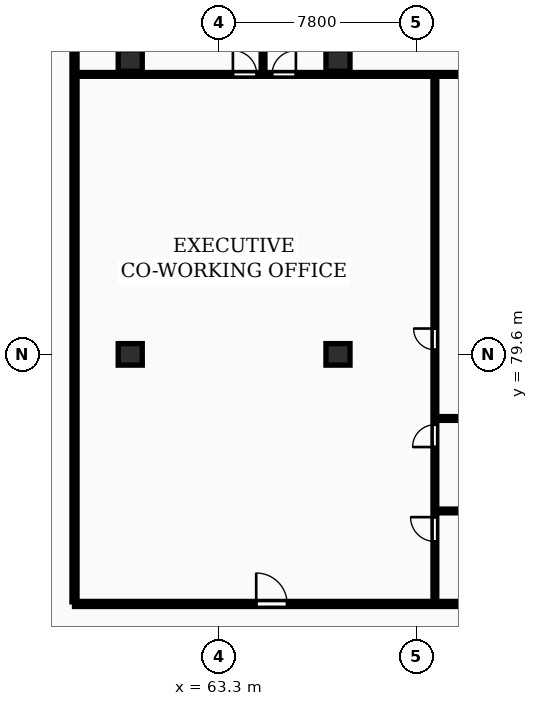
"""IFC4 building model, lengths in metres.
Left out: names, types, materials, properties, quantities, classifications, styles, units other than length and angle.
Written with IfcOpenShell. Run it as: python <this file> out.ifc"""

import sys

from ifc_helpers import new_model, si_unit, direction, frame, frame_2d, origin, origin_2d, place, context, subcontext, project, spatial, rectangle, extrude, element, fill, save


model = new_model("IFC4")
c1 = context("Model", 3, precision=1e-05, world=origin(), true_north=direction((0.0, 1.0)))
c2 = subcontext(c1, "Body", "Model", "MODEL_VIEW")
j1 = project(units=[si_unit("LENGTHUNIT", "METRE"), si_unit("PLANEANGLEUNIT", "RADIAN")], contexts=[c1])
p1 = place(None, origin())
s1 = spatial("IfcSite", under=j1, at=p1, CompositionType="ELEMENT")
p2 = place(p1, origin())
s2 = spatial("IfcBuilding", under=s1, at=p2, CompositionType="ELEMENT")
p3 = place(p2, frame((0.0, 0.0, 113.3)))
s3 = spatial("IfcBuildingStorey", under=s2, at=p3, CompositionType="ELEMENT", Elevation=113.3)
for number, where, z_axis, x_axis in (
    (1, (59.8, 79.6, 0.0), (0.0, 0.0, 1.0), (1.0, 0.0, 0.0)),
    (2, (59.8, 91.2, 0.0), (0.0, 0.0, 1.0), (1.0, 0.0, 0.0)),
    (3, (68.0, 79.6, 0.0), (0.0, 0.0, 1.0), (1.0, 0.0, 0.0)),
    (4, (68.0, 91.2, 0.0), (0.0, 0.0, 1.0), (1.0, 0.0, 0.0)),
):
    element("IfcColumn", number, at=place(p3, frame(where, z_axis=z_axis, x_axis=x_axis)), inside=s3, PredefinedType="COLUMN", context=c2, shape_type="SweptSolid", body=[
        extrude(rectangle(XDim=0.95, YDim=0.85, at=origin_2d()), origin(), (0.0, 0.0, 1.0), 3.25),
    ])
p4 = place(p3, frame((57.6, 69.83, 0.0), z_axis=(0.0, 0.0, 1.0), x_axis=(0.0, 1.0, 0.0)))
e5 = element("IfcWall", 5, at=p4, inside=s3, PredefinedType="PARTITIONING", context=c2, shape_type="SweptSolid", body=[
    extrude(rectangle(XDim=26.07, YDim=0.2, at=frame_2d((13.035, 0.0))), origin(), (0.0, 0.0, 1.0), 2.97),
])
for number, where, z_axis, x_axis in (
    (6, (71.885, 73.42, 0.0), (0.0, 0.0, 1.0), (1.0, 0.0, 0.0)),
    (7, (71.885, 77.07, 0.0), (0.0, 0.0, 1.0), (1.0, 0.0, 0.0)),
):
    element("IfcWall", number, at=place(p3, frame(where, z_axis=z_axis, x_axis=x_axis)), inside=s3, PredefinedType="PARTITIONING", context=c2, shape_type="SweptSolid", body=[
        extrude(rectangle(XDim=3.36, YDim=0.15, at=frame_2d((1.68, 0.0))), origin(), (0.0, 0.0, 1.0), 2.97),
    ])
p5 = place(p3, frame((71.825, 69.81, 0.0), z_axis=(0.0, 0.0, 1.0), x_axis=(0.0, 1.0, 0.0)))
e8 = element("IfcWall", 8, at=p5, inside=s3, PredefinedType="PARTITIONING", context=c2, shape_type="SweptSolid", body=[
    extrude(rectangle(XDim=20.78, YDim=0.15, at=frame_2d((10.39, 0.0))), origin(), (0.0, 0.0, 1.0), 2.97),
])
p6 = place(p5, frame((2.406, 0.0, 0.0)))
e9 = element("IfcOpeningElement", 9, at=p6, cuts=e8, PredefinedType="OPENING", context=c2, shape_type="SweptSolid", body=[
    extrude(rectangle(XDim=0.96, YDim=2.1, at=frame_2d((0.48, 1.05))), frame((0.0, 0.085, 0.0), z_axis=(0.0, -1.0, 0.0), x_axis=(1.0, 0.0, 0.0)), (0.0, 0.0, 1.0), 0.17),
])
p7 = place(p5, frame((6.133, 0.0, 0.0)))
e10 = element("IfcOpeningElement", 10, at=p7, cuts=e8, PredefinedType="OPENING", context=c2, shape_type="SweptSolid", body=[
    extrude(rectangle(XDim=0.88, YDim=2.06, at=frame_2d((0.44, 1.03))), frame((0.0, 0.085, 0.0), z_axis=(0.0, -1.0, 0.0), x_axis=(1.0, 0.0, 0.0)), (0.0, 0.0, 1.0), 0.17),
])
p8 = place(p5, frame((9.97, 0.0, 0.0)))
e11 = element("IfcOpeningElement", 11, at=p8, cuts=e8, PredefinedType="OPENING", context=c2, shape_type="SweptSolid", body=[
    extrude(rectangle(XDim=0.84, YDim=2.04, at=frame_2d((0.42, 1.02))), frame((0.0, 0.085, 0.0), z_axis=(0.0, -1.0, 0.0), x_axis=(1.0, 0.0, 0.0)), (0.0, 0.0, 1.0), 0.17),
])
p9 = place(p3, frame((65.042, 90.73, 0.0), z_axis=(0.0, 0.0, 1.0), x_axis=(0.0, 1.0, 0.0)))
e12 = element("IfcWall", 12, at=p9, inside=s3, PredefinedType="PARTITIONING", context=c2, shape_type="SweptSolid", body=[
    extrude(rectangle(XDim=5.17, YDim=0.15, at=frame_2d((2.585, 0.0))), origin(), (0.0, 0.0, 1.0), 2.97),
])
p10 = place(p3, frame((57.68, 90.65, 0.0), z_axis=(0.0, 0.0, 1.0), x_axis=(1.0, 0.0, 0.0)))
e13 = element("IfcWall", 13, at=p10, inside=s3, PredefinedType="PARTITIONING", context=c2, shape_type="SweptSolid", body=[
    extrude(rectangle(XDim=17.565, YDim=0.15, at=frame_2d((8.782, 0.0))), origin(), (0.0, 0.0, 1.0), 2.97),
])
p11 = place(p10, frame((6.172, 0.0, 0.0)))
e14 = element("IfcOpeningElement", 14, at=p11, cuts=e13, PredefinedType="OPENING", context=c2, shape_type="SweptSolid", body=[
    extrude(rectangle(XDim=0.94, YDim=2.1, at=frame_2d((0.47, 1.05))), frame((0.0, 0.085, 0.0), z_axis=(0.0, -1.0, 0.0), x_axis=(1.0, 0.0, 0.0)), (0.0, 0.0, 1.0), 0.17),
])
p12 = place(p10, frame((7.719, 0.0, 0.0)))
e15 = element("IfcOpeningElement", 15, at=p12, cuts=e13, PredefinedType="OPENING", context=c2, shape_type="SweptSolid", body=[
    extrude(rectangle(XDim=0.94, YDim=2.1, at=frame_2d((0.47, 1.05))), frame((0.0, 0.085, 0.0), z_axis=(0.0, -1.0, 0.0), x_axis=(1.0, 0.0, 0.0)), (0.0, 0.0, 1.0), 0.17),
])
p13 = place(p3, frame((57.6, 69.75, 0.0), z_axis=(0.0, 0.0, 1.0), x_axis=(1.0, 0.0, 0.0)))
e16 = element("IfcWall", 16, at=p13, inside=s3, PredefinedType="PARTITIONING", context=c2, shape_type="SweptSolid", body=[
    extrude(rectangle(XDim=73.0, YDim=0.2, at=frame_2d((36.5, 0.0))), origin(), (0.0, 0.0, 1.0), 2.97),
])
p14 = place(p13, frame((7.172, 0.0, 0.0)))
e17 = element("IfcOpeningElement", 17, at=p14, cuts=e16, PredefinedType="OPENING", context=c2, shape_type="SweptSolid", body=[
    extrude(rectangle(XDim=1.22, YDim=2.18, at=frame_2d((0.61, 1.09))), frame((0.0, 0.11, 0.0), z_axis=(0.0, -1.0, 0.0), x_axis=(1.0, 0.0, 0.0)), (0.0, 0.0, 1.0), 0.22),
])
p15 = place(p13, frame((23.96, 0.0, 0.0)))
e18 = element("IfcOpeningElement", 18, at=p15, cuts=e16, PredefinedType="OPENING", context=c2, shape_type="SweptSolid", body=[
    extrude(rectangle(XDim=1.22, YDim=2.18, at=frame_2d((0.61, 1.09))), frame((0.0, 0.11, 0.0), z_axis=(0.0, -1.0, 0.0), x_axis=(1.0, 0.0, 0.0)), (0.0, 0.0, 1.0), 0.22),
])
p16 = place(p13, frame((38.846, 0.0, 0.0)))
e19 = element("IfcOpeningElement", 19, at=p16, cuts=e16, PredefinedType="OPENING", context=c2, shape_type="SweptSolid", body=[
    extrude(rectangle(XDim=0.95, YDim=2.15, at=frame_2d((0.475, 1.075))), frame((0.0, 0.11, 0.0), z_axis=(0.0, -1.0, 0.0), x_axis=(1.0, 0.0, 0.0)), (0.0, 0.0, 1.0), 0.22),
])
p17 = place(p13, frame((50.262, 0.0, 0.0)))
e20 = element("IfcOpeningElement", 20, at=p17, cuts=e16, PredefinedType="OPENING", context=c2, shape_type="SweptSolid", body=[
    extrude(rectangle(XDim=0.95, YDim=2.15, at=frame_2d((0.475, 1.075))), frame((0.0, 0.11, 0.0), z_axis=(0.0, -1.0, 0.0), x_axis=(1.0, 0.0, 0.0)), (0.0, 0.0, 1.0), 0.22),
])
p18 = place(p13, frame((63.754, 0.0, 0.0)))
e21 = element("IfcOpeningElement", 21, at=p18, cuts=e16, PredefinedType="OPENING", context=c2, shape_type="SweptSolid", body=[
    extrude(rectangle(XDim=0.95, YDim=2.15, at=frame_2d((0.475, 1.075))), frame((0.0, 0.11, 0.0), z_axis=(0.0, -1.0, 0.0), x_axis=(1.0, 0.0, 0.0)), (0.0, 0.0, 1.0), 0.22),
])
p19 = place(p6, origin())
e22 = element("IfcDoor", 22, at=p19, inside=s3, OperationType="SINGLE_SWING_RIGHT", PredefinedType="DOOR", context=c2, shape_type="SweptSolid", body=[
    extrude(rectangle(XDim=0.96, YDim=2.1, at=frame_2d((0.48, 1.05))), frame((0.0, 0.025, 0.0), z_axis=(0.0, -1.0, 0.0), x_axis=(1.0, 0.0, 0.0)), (0.0, 0.0, 1.0), 0.05),
])
fill(e9, e22)
p20 = place(p7, origin())
e23 = element("IfcDoor", 23, at=p20, inside=s3, OperationType="SINGLE_SWING_LEFT", PredefinedType="DOOR", context=c2, shape_type="SweptSolid", body=[
    extrude(rectangle(XDim=0.88, YDim=2.06, at=frame_2d((0.44, 1.03))), frame((0.0, 0.025, 0.0), z_axis=(0.0, -1.0, 0.0), x_axis=(1.0, 0.0, 0.0)), (0.0, 0.0, 1.0), 0.05),
])
fill(e10, e23)
p21 = place(p8, origin())
e24 = element("IfcDoor", 24, at=p21, inside=s3, OperationType="SINGLE_SWING_RIGHT", PredefinedType="DOOR", context=c2, shape_type="SweptSolid", body=[
    extrude(rectangle(XDim=0.84, YDim=2.04, at=frame_2d((0.42, 1.02))), frame((0.0, 0.025, 0.0), z_axis=(0.0, -1.0, 0.0), x_axis=(1.0, 0.0, 0.0)), (0.0, 0.0, 1.0), 0.05),
])
fill(e11, e24)
p22 = place(p11, origin())
e25 = element("IfcDoor", 25, at=p22, inside=s3, OperationType="SINGLE_SWING_LEFT", PredefinedType="DOOR", context=c2, shape_type="SweptSolid", body=[
    extrude(rectangle(XDim=0.94, YDim=2.1, at=frame_2d((0.47, 1.05))), frame((0.0, 0.025, 0.0), z_axis=(0.0, -1.0, 0.0), x_axis=(1.0, 0.0, 0.0)), (0.0, 0.0, 1.0), 0.05),
])
fill(e14, e25)
p23 = place(p12, origin())
e26 = element("IfcDoor", 26, at=p23, inside=s3, OperationType="SINGLE_SWING_RIGHT", PredefinedType="DOOR", context=c2, shape_type="SweptSolid", body=[
    extrude(rectangle(XDim=0.94, YDim=2.1, at=frame_2d((0.47, 1.05))), frame((0.0, 0.025, 0.0), z_axis=(0.0, -1.0, 0.0), x_axis=(1.0, 0.0, 0.0)), (0.0, 0.0, 1.0), 0.05),
])
fill(e15, e26)
p24 = place(p14, origin())
e27 = element("IfcDoor", 27, at=p24, inside=s3, OperationType="SINGLE_SWING_LEFT", PredefinedType="DOOR", context=c2, shape_type="SweptSolid", body=[
    extrude(rectangle(XDim=1.22, YDim=2.18, at=frame_2d((0.61, 1.09))), frame((0.0, 0.025, 0.0), z_axis=(0.0, -1.0, 0.0), x_axis=(1.0, 0.0, 0.0)), (0.0, 0.0, 1.0), 0.05),
])
fill(e17, e27)
save(model, sys.argv[1])
